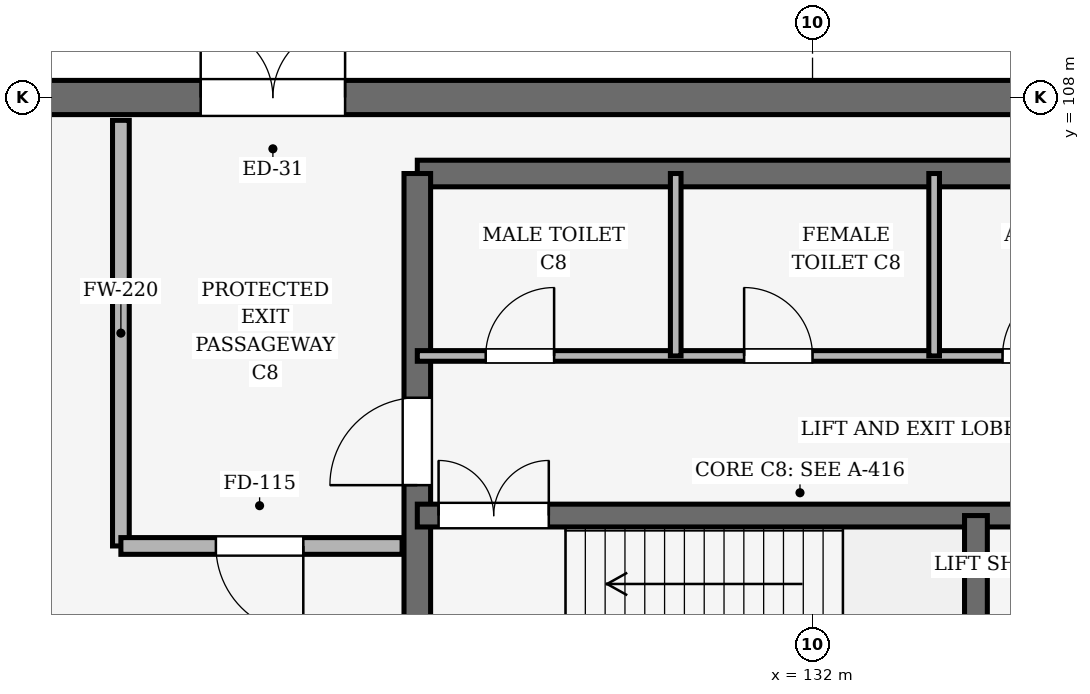
"""IFC4 building model, lengths in metres.
Left out: names, types, materials, properties, quantities, classifications, styles, units other than length and angle.
Written with IfcOpenShell. Run it as: python <this file> out.ifc"""

import sys

from ifc_helpers import new_model, si_unit, direction, frame, frame_2d, origin, place, context, subcontext, project, spatial, rectangle, extrude, element, fill, save


model = new_model("IFC4")
c1 = context("Model", 3, precision=1e-05, world=origin(), true_north=direction((0.0, 1.0)))
c2 = subcontext(c1, "Body", "Model", "MODEL_VIEW")
j1 = project(units=[si_unit("LENGTHUNIT", "METRE"), si_unit("PLANEANGLEUNIT", "RADIAN")], contexts=[c1])
p1 = place(None, origin())
s1 = spatial("IfcSite", under=j1, at=p1, CompositionType="ELEMENT")
p2 = place(p1, origin())
s2 = spatial("IfcBuilding", under=s1, at=p2, CompositionType="ELEMENT")
p3 = place(p2, origin())
s3 = spatial("IfcBuildingStorey", under=s2, at=p3, CompositionType="ELEMENT", Elevation=0.0)
p4 = place(p3, frame((138.0, 108.0, 0.0), z_axis=(0.0, 0.0, 1.0), x_axis=(-1.0, 0.0, 0.0)))
e1 = element("IfcWall", 1, at=p4, inside=s3, PredefinedType="SOLIDWALL", context=c2, shape_type="SweptSolid", body=[
    extrude(rectangle(XDim=18.0, YDim=0.45, at=frame_2d((9.0, 0.0))), origin(), (0.0, 0.0, 1.0), 4.65),
])
p5 = place(p4, frame((12.15, 0.0, 0.0)))
e2 = element("IfcOpeningElement", 2, at=p5, cuts=e1, PredefinedType="OPENING", context=c2, shape_type="SweptSolid", body=[
    extrude(rectangle(XDim=1.9, YDim=2.35, at=frame_2d((0.95, 1.175))), frame((0.0, 0.235, 0.0), z_axis=(0.0, -1.0, 0.0), x_axis=(1.0, 0.0, 0.0)), (0.0, 0.0, 1.0), 0.47),
])
p6 = place(p3, frame((137.0, 107.0, 0.0), z_axis=(0.0, 0.0, 1.0), x_axis=(-1.0, 0.0, 0.0)))
e3 = element("IfcWall", 3, at=p6, inside=s3, PredefinedType="SHEAR", context=c2, shape_type="SweptSolid", body=[
    extrude(rectangle(XDim=10.2, YDim=0.35, at=frame_2d((5.1, 0.0))), origin(), (0.0, 0.0, 1.0), 5.4),
])
p7 = place(p3, frame((126.8, 107.0, 0.0), z_axis=(0.0, 0.0, 1.0), x_axis=(0.0, -1.0, 0.0)))
e4 = element("IfcWall", 4, at=p7, inside=s3, PredefinedType="SHEAR", context=c2, shape_type="SweptSolid", body=[
    extrude(rectangle(XDim=8.4, YDim=0.35, at=frame_2d((4.2, 0.0))), origin(), (0.0, 0.0, 1.0), 5.4),
])
p8 = place(p7, frame((2.95, 0.0, 0.0)))
e5 = element("IfcOpeningElement", 5, at=p8, cuts=e4, PredefinedType="OPENING", context=c2, shape_type="SweptSolid", body=[
    extrude(rectangle(XDim=1.15, YDim=2.15, at=frame_2d((0.575, 1.075))), frame((0.0, 0.185, 0.0), z_axis=(0.0, -1.0, 0.0), x_axis=(1.0, 0.0, 0.0)), (0.0, 0.0, 1.0), 0.37),
])
p9 = place(p3, frame((126.8, 102.5, 0.0), z_axis=(0.0, 0.0, 1.0), x_axis=(1.0, 0.0, 0.0)))
e6 = element("IfcWall", 6, at=p9, inside=s3, PredefinedType="SHEAR", context=c2, shape_type="SweptSolid", body=[
    extrude(rectangle(XDim=10.2, YDim=0.3, at=frame_2d((5.1, 0.0))), origin(), (0.0, 0.0, 1.0), 5.4),
])
p10 = place(p9, frame((0.28, 0.0, 0.0)))
e7 = element("IfcOpeningElement", 7, at=p10, cuts=e6, PredefinedType="OPENING", context=c2, shape_type="SweptSolid", body=[
    extrude(rectangle(XDim=1.45, YDim=2.15, at=frame_2d((0.725, 1.075))), frame((0.0, 0.16, 0.0), z_axis=(0.0, -1.0, 0.0), x_axis=(1.0, 0.0, 0.0)), (0.0, 0.0, 1.0), 0.32),
])
p11 = place(p9, frame((8.225, 0.0, 0.0)))
e8 = element("IfcOpeningElement", 8, at=p11, cuts=e6, PredefinedType="OPENING", context=c2, shape_type="SweptSolid", body=[
    extrude(rectangle(XDim=1.1, YDim=2.15, at=frame_2d((0.55, 1.075))), frame((0.0, 0.16, 0.0), z_axis=(0.0, -1.0, 0.0), x_axis=(1.0, 0.0, 0.0)), (0.0, 0.0, 1.0), 0.32),
])
p12 = place(p3, frame((134.15, 98.6, 0.0), z_axis=(0.0, 0.0, 1.0), x_axis=(0.0, 1.0, 0.0)))
e9 = element("IfcWall", 9, at=p12, inside=s3, PredefinedType="SHEAR", context=c2, shape_type="SweptSolid", body=[
    extrude(rectangle(XDim=3.9, YDim=0.3, at=frame_2d((1.95, 0.0))), origin(), (0.0, 0.0, 1.0), 5.4),
])
p13 = place(p3, frame((126.8, 104.6, 0.0), z_axis=(0.0, 0.0, 1.0), x_axis=(1.0, 0.0, 0.0)))
e10 = element("IfcWall", 10, at=p13, inside=s3, PredefinedType="PARTITIONING", context=c2, shape_type="SweptSolid", body=[
    extrude(rectangle(XDim=10.2, YDim=0.14, at=frame_2d((5.1, 0.0))), origin(), (0.0, 0.0, 1.0), 4.5),
])
p14 = place(p13, frame((0.9, 0.0, 0.0)))
e11 = element("IfcOpeningElement", 11, at=p14, cuts=e10, PredefinedType="OPENING", context=c2, shape_type="SweptSolid", body=[
    extrude(rectangle(XDim=0.9, YDim=2.1, at=frame_2d((0.45, 1.05))), frame((0.0, 0.08, 0.0), z_axis=(0.0, -1.0, 0.0), x_axis=(1.0, 0.0, 0.0)), (0.0, 0.0, 1.0), 0.16),
])
p15 = place(p13, frame((4.3, 0.0, 0.0)))
e12 = element("IfcOpeningElement", 12, at=p15, cuts=e10, PredefinedType="OPENING", context=c2, shape_type="SweptSolid", body=[
    extrude(rectangle(XDim=0.9, YDim=2.1, at=frame_2d((0.45, 1.05))), frame((0.0, 0.08, 0.0), z_axis=(0.0, -1.0, 0.0), x_axis=(1.0, 0.0, 0.0)), (0.0, 0.0, 1.0), 0.16),
])
p16 = place(p13, frame((7.7, 0.0, 0.0)))
e13 = element("IfcOpeningElement", 13, at=p16, cuts=e10, PredefinedType="OPENING", context=c2, shape_type="SweptSolid", body=[
    extrude(rectangle(XDim=0.95, YDim=2.1, at=frame_2d((0.475, 1.05))), frame((0.0, 0.08, 0.0), z_axis=(0.0, -1.0, 0.0), x_axis=(1.0, 0.0, 0.0)), (0.0, 0.0, 1.0), 0.16),
])
for number, where, z_axis, x_axis in (
    (14, (130.2, 104.6, 0.0), (0.0, 0.0, 1.0), (0.0, 1.0, 0.0)),
    (15, (133.6, 104.6, 0.0), (0.0, 0.0, 1.0), (0.0, 1.0, 0.0)),
):
    element("IfcWall", number, at=place(p3, frame(where, z_axis=z_axis, x_axis=x_axis)), inside=s3, PredefinedType="PARTITIONING", context=c2, shape_type="SweptSolid", body=[
        extrude(rectangle(XDim=2.4, YDim=0.14, at=frame_2d((1.2, 0.0))), origin(), (0.0, 0.0, 1.0), 4.5),
    ])
p17 = place(p3, frame((122.9, 107.7, 0.0), z_axis=(0.0, 0.0, 1.0), x_axis=(0.0, -1.0, 0.0)))
e16 = element("IfcWall", 16, at=p17, inside=s3, PredefinedType="SOLIDWALL", context=c2, shape_type="SweptSolid", body=[
    extrude(rectangle(XDim=5.6, YDim=0.22, at=frame_2d((2.8, 0.0))), origin(), (0.0, 0.0, 1.0), 4.6),
])
p18 = place(p3, frame((122.9, 102.1, 0.0), z_axis=(0.0, 0.0, 1.0), x_axis=(1.0, 0.0, 0.0)))
e17 = element("IfcWall", 17, at=p18, inside=s3, PredefinedType="SOLIDWALL", context=c2, shape_type="SweptSolid", body=[
    extrude(rectangle(XDim=3.7, YDim=0.22, at=frame_2d((1.85, 0.0))), origin(), (0.0, 0.0, 1.0), 4.6),
])
p19 = place(p18, frame((1.25, 0.0, 0.0)))
e18 = element("IfcOpeningElement", 18, at=p19, cuts=e17, PredefinedType="OPENING", context=c2, shape_type="SweptSolid", body=[
    extrude(rectangle(XDim=1.15, YDim=2.15, at=frame_2d((0.575, 1.075))), frame((0.0, 0.12, 0.0), z_axis=(0.0, -1.0, 0.0), x_axis=(1.0, 0.0, 0.0)), (0.0, 0.0, 1.0), 0.24),
])
p20 = place(p5, frame((1.9, 0.0, 0.0), z_axis=(0.0, 0.0, 1.0), x_axis=(-1.0, 0.0, 0.0)))
e19 = element("IfcDoor", 19, at=p20, inside=s3, OperationType="DOUBLE_DOOR_SINGLE_SWING", PredefinedType="DOOR", context=c2, shape_type="SweptSolid", body=[
    extrude(rectangle(XDim=1.9, YDim=2.35, at=frame_2d((0.95, 1.175))), frame((0.0, 0.025, 0.0), z_axis=(0.0, -1.0, 0.0), x_axis=(1.0, 0.0, 0.0)), (0.0, 0.0, 1.0), 0.05),
])
fill(e2, e19)
p21 = place(p8, frame((1.15, 0.0, 0.0), z_axis=(0.0, 0.0, 1.0), x_axis=(-1.0, 0.0, 0.0)))
e20 = element("IfcDoor", 20, at=p21, inside=s3, OperationType="SINGLE_SWING_LEFT", PredefinedType="DOOR", context=c2, shape_type="SweptSolid", body=[
    extrude(rectangle(XDim=1.15, YDim=2.15, at=frame_2d((0.575, 1.075))), frame((0.0, 0.025, 0.0), z_axis=(0.0, -1.0, 0.0), x_axis=(1.0, 0.0, 0.0)), (0.0, 0.0, 1.0), 0.05),
])
fill(e5, e20)
p22 = place(p10, origin())
e21 = element("IfcDoor", 21, at=p22, inside=s3, OperationType="DOUBLE_DOOR_SINGLE_SWING", PredefinedType="DOOR", context=c2, shape_type="SweptSolid", body=[
    extrude(rectangle(XDim=1.45, YDim=2.15, at=frame_2d((0.725, 1.075))), frame((0.0, 0.025, 0.0), z_axis=(0.0, -1.0, 0.0), x_axis=(1.0, 0.0, 0.0)), (0.0, 0.0, 1.0), 0.05),
])
fill(e7, e21)
p23 = place(p14, origin())
e22 = element("IfcDoor", 22, at=p23, inside=s3, OperationType="SINGLE_SWING_RIGHT", PredefinedType="DOOR", context=c2, shape_type="SweptSolid", body=[
    extrude(rectangle(XDim=0.9, YDim=2.1, at=frame_2d((0.45, 1.05))), frame((0.0, 0.025, 0.0), z_axis=(0.0, -1.0, 0.0), x_axis=(1.0, 0.0, 0.0)), (0.0, 0.0, 1.0), 0.05),
])
fill(e11, e22)
p24 = place(p15, origin())
e23 = element("IfcDoor", 23, at=p24, inside=s3, OperationType="SINGLE_SWING_LEFT", PredefinedType="DOOR", context=c2, shape_type="SweptSolid", body=[
    extrude(rectangle(XDim=0.9, YDim=2.1, at=frame_2d((0.45, 1.05))), frame((0.0, 0.025, 0.0), z_axis=(0.0, -1.0, 0.0), x_axis=(1.0, 0.0, 0.0)), (0.0, 0.0, 1.0), 0.05),
])
fill(e12, e23)
p25 = place(p16, origin())
e24 = element("IfcDoor", 24, at=p25, inside=s3, OperationType="SINGLE_SWING_RIGHT", PredefinedType="DOOR", context=c2, shape_type="SweptSolid", body=[
    extrude(rectangle(XDim=0.95, YDim=2.1, at=frame_2d((0.475, 1.05))), frame((0.0, 0.025, 0.0), z_axis=(0.0, -1.0, 0.0), x_axis=(1.0, 0.0, 0.0)), (0.0, 0.0, 1.0), 0.05),
])
fill(e13, e24)
p26 = place(p19, frame((1.15, 0.0, 0.0), z_axis=(0.0, 0.0, 1.0), x_axis=(-1.0, 0.0, 0.0)))
e25 = element("IfcDoor", 25, at=p26, inside=s3, OperationType="SINGLE_SWING_LEFT", PredefinedType="DOOR", context=c2, shape_type="SweptSolid", body=[
    extrude(rectangle(XDim=1.15, YDim=2.15, at=frame_2d((0.575, 1.075))), frame((0.0, 0.025, 0.0), z_axis=(0.0, -1.0, 0.0), x_axis=(1.0, 0.0, 0.0)), (0.0, 0.0, 1.0), 0.05),
])
fill(e18, e25)
save(model, sys.argv[1])
